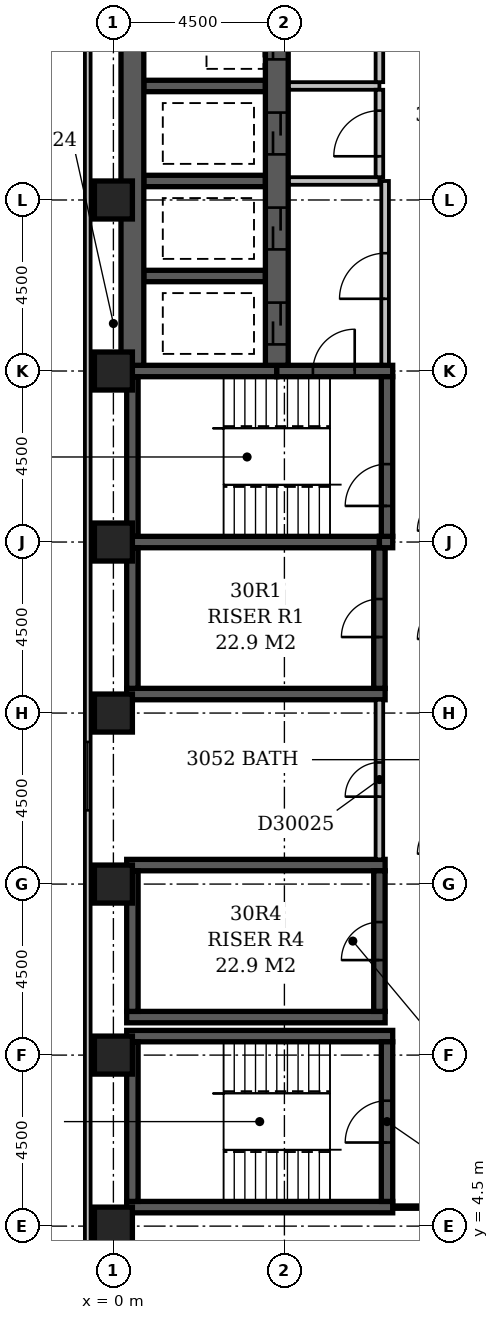
"""IFC4 building model, lengths in metres.
Left out: names, types, materials, properties, quantities, classifications, styles, units other than length and angle.
Written with IfcOpenShell. Run it as: python <this file> out.ifc"""

import sys

from ifc_helpers import new_model, si_unit, direction, frame, frame_2d, origin, origin_2d, place, context, subcontext, project, spatial, rectangle, extrude, element, fill, save


model = new_model("IFC4")
c1 = context("Model", 3, precision=1e-05, world=origin(), true_north=direction((0.0, 1.0)))
c2 = subcontext(c1, "Body", "Model", "MODEL_VIEW")
j1 = project(units=[si_unit("LENGTHUNIT", "METRE"), si_unit("PLANEANGLEUNIT", "RADIAN")], contexts=[c1])
p1 = place(None, origin())
s1 = spatial("IfcSite", under=j1, at=p1, CompositionType="ELEMENT")
p2 = place(p1, origin())
s2 = spatial("IfcBuilding", under=s1, at=p2, CompositionType="ELEMENT")
p3 = place(p2, frame((0.0, 0.0, 123.2)))
s3 = spatial("IfcBuildingStorey", under=s2, at=p3, CompositionType="ELEMENT", Elevation=123.2)
for number, where, z_axis, x_axis in (
    (1, (0.35, 5.0, -0.3), (0.0, 0.0, 1.0), (1.0, 0.0, 0.0)),
    (2, (0.35, 9.5, -0.3), (0.0, 0.0, 1.0), (1.0, 0.0, 0.0)),
):
    element("IfcWall", number, at=place(p3, frame(where, z_axis=z_axis, x_axis=x_axis)), inside=s3, PredefinedType="SHEAR", context=c2, shape_type="SweptSolid", body=[
        extrude(rectangle(XDim=7.0, YDim=0.3, at=frame_2d((3.5, 0.0))), origin(), (0.0, 0.0, 1.0), 3.6),
    ])
for number, where, z_axis, x_axis in (
    (3, (0.35, 10.0, -0.3), (0.0, 0.0, 1.0), (1.0, 0.0, 0.0)),
    (4, (0.35, 14.0, -0.3), (0.0, 0.0, 1.0), (1.0, 0.0, 0.0)),
    (5, (0.35, 18.5, -0.3), (0.0, 0.0, 1.0), (1.0, 0.0, 0.0)),
):
    element("IfcWall", number, at=place(p3, frame(where, z_axis=z_axis, x_axis=x_axis)), inside=s3, PredefinedType="SHEAR", context=c2, shape_type="SweptSolid", body=[
        extrude(rectangle(XDim=6.8, YDim=0.3, at=frame_2d((3.4, 0.0))), origin(), (0.0, 0.0, 1.0), 3.6),
    ])
p4 = place(p3, frame((0.35, 22.5, -0.3), z_axis=(0.0, 0.0, 1.0), x_axis=(1.0, 0.0, 0.0)))
e6 = element("IfcWall", 6, at=p4, inside=s3, PredefinedType="SHEAR", context=c2, shape_type="SweptSolid", body=[
    extrude(rectangle(XDim=6.65, YDim=0.3, at=frame_2d((3.325, 0.0))), origin(), (0.0, 0.0, 1.0), 3.6),
])
p5 = place(p3, frame((0.35, 27.0, -0.3), z_axis=(0.0, 0.0, 1.0), x_axis=(1.0, 0.0, 0.0)))
e7 = element("IfcWall", 7, at=p5, inside=s3, PredefinedType="SHEAR", context=c2, shape_type="SweptSolid", body=[
    extrude(rectangle(XDim=3.95, YDim=0.3, at=frame_2d((1.975, 0.0))), origin(), (0.0, 0.0, 1.0), 3.6),
])
p6 = place(p3, frame((0.5, 5.15, -0.3), z_axis=(0.0, 0.0, 1.0), x_axis=(0.0, 1.0, 0.0)))
e8 = element("IfcWall", 8, at=p6, inside=s3, PredefinedType="SHEAR", context=c2, shape_type="SweptSolid", body=[
    extrude(rectangle(XDim=4.2, YDim=0.3, at=frame_2d((2.1, 0.0))), origin(), (0.0, 0.0, 1.0), 3.6),
])
for number, where, z_axis, x_axis in (
    (9, (0.5, 10.15, -0.3), (0.0, 0.0, 1.0), (0.0, 1.0, 0.0)),
    (10, (0.5, 18.65, -0.3), (0.0, 0.0, 1.0), (0.0, 1.0, 0.0)),
):
    element("IfcWall", number, at=place(p3, frame(where, z_axis=z_axis, x_axis=x_axis)), inside=s3, PredefinedType="SHEAR", context=c2, shape_type="SweptSolid", body=[
        extrude(rectangle(XDim=3.7, YDim=0.3, at=frame_2d((1.85, 0.0))), origin(), (0.0, 0.0, 1.0), 3.6),
    ])
p7 = place(p3, frame((0.5, 22.65, -0.3), z_axis=(0.0, 0.0, 1.0), x_axis=(0.0, 1.0, 0.0)))
e11 = element("IfcWall", 11, at=p7, inside=s3, PredefinedType="SHEAR", context=c2, shape_type="SweptSolid", body=[
    extrude(rectangle(XDim=4.2, YDim=0.3, at=frame_2d((2.1, 0.0))), origin(), (0.0, 0.0, 1.0), 3.6),
])
p8 = place(p3, frame((0.5, 27.15, -0.3), z_axis=(0.0, 0.0, 1.0), x_axis=(0.0, 1.0, 0.0)))
e12 = element("IfcWall", 12, at=p8, inside=s3, PredefinedType="SHEAR", context=c2, shape_type="SweptSolid", body=[
    extrude(rectangle(XDim=22.05, YDim=0.6, at=frame_2d((11.025, 0.0))), origin(), (0.0, 0.0, 1.0), 3.6),
])
for number, where, z_axis, x_axis in (
    (13, (0.8, 29.5, -0.3), (0.0, 0.0, 1.0), (1.0, 0.0, 0.0)),
    (14, (0.8, 32.0, -0.3), (0.0, 0.0, 1.0), (1.0, 0.0, 0.0)),
    (15, (0.8, 34.5, -0.3), (0.0, 0.0, 1.0), (1.0, 0.0, 0.0)),
):
    element("IfcWall", number, at=place(p3, frame(where, z_axis=z_axis, x_axis=x_axis)), inside=s3, PredefinedType="SHEAR", context=c2, shape_type="SweptSolid", body=[
        extrude(rectangle(XDim=3.2, YDim=0.3, at=frame_2d((1.6, 0.0))), origin(), (0.0, 0.0, 1.0), 3.6),
    ])
p9 = place(p3, frame((4.3, 27.0, -0.3), z_axis=(0.0, 0.0, 1.0), x_axis=(1.0, 0.0, 0.0)))
e16 = element("IfcWall", 16, at=p9, inside=s3, PredefinedType="SHEAR", context=c2, shape_type="SweptSolid", body=[
    extrude(rectangle(XDim=3.05, YDim=0.3, at=frame_2d((1.525, 0.0))), origin(), (0.0, 0.0, 1.0), 3.6),
])
p10 = place(p9, frame((0.95, 0.0, 0.3)))
e17 = element("IfcOpeningElement", 17, at=p10, cuts=e16, PredefinedType="OPENING", context=c2, shape_type="SweptSolid", body=[
    extrude(rectangle(XDim=1.1, YDim=2.1, at=frame_2d((0.55, 1.05))), frame((0.0, 0.162, 0.0), z_axis=(0.0, -1.0, 0.0), x_axis=(1.0, 0.0, 0.0)), (0.0, 0.0, 1.0), 0.324),
])
p11 = place(p3, frame((4.3, 27.15, -0.3), z_axis=(0.0, 0.0, 1.0), x_axis=(0.0, 1.0, 0.0)))
e18 = element("IfcWall", 18, at=p11, inside=s3, PredefinedType="SHEAR", context=c2, shape_type="SweptSolid", body=[
    extrude(rectangle(XDim=22.05, YDim=0.6, at=frame_2d((11.025, 0.0))), origin(), (0.0, 0.0, 1.0), 3.6),
])
p12 = place(p11, frame((3.05, 0.0, 0.3)))
e19 = element("IfcOpeningElement", 19, at=p12, cuts=e18, PredefinedType="OPENING", context=c2, shape_type="SweptSolid", body=[
    extrude(rectangle(XDim=1.1, YDim=2.1, at=frame_2d((0.55, 1.05))), frame((0.0, 0.312, 0.0), z_axis=(0.0, -1.0, 0.0), x_axis=(1.0, 0.0, 0.0)), (0.0, 0.0, 1.0), 0.624),
])
p13 = place(p11, frame((0.55, 0.0, 0.3)))
e20 = element("IfcOpeningElement", 20, at=p13, cuts=e18, PredefinedType="OPENING", context=c2, shape_type="SweptSolid", body=[
    extrude(rectangle(XDim=1.1, YDim=2.1, at=frame_2d((0.55, 1.05))), frame((0.0, 0.312, 0.0), z_axis=(0.0, -1.0, 0.0), x_axis=(1.0, 0.0, 0.0)), (0.0, 0.0, 1.0), 0.624),
])
p14 = place(p11, frame((20.55, 0.0, 0.3)))
e21 = element("IfcOpeningElement", 21, at=p14, cuts=e18, PredefinedType="OPENING", context=c2, shape_type="SweptSolid", body=[
    extrude(rectangle(XDim=1.1, YDim=2.1, at=frame_2d((0.55, 1.05))), frame((0.0, 0.312, 0.0), z_axis=(0.0, -1.0, 0.0), x_axis=(1.0, 0.0, 0.0)), (0.0, 0.0, 1.0), 0.624),
])
p15 = place(p11, frame((18.05, 0.0, 0.3)))
e22 = element("IfcOpeningElement", 22, at=p15, cuts=e18, PredefinedType="OPENING", context=c2, shape_type="SweptSolid", body=[
    extrude(rectangle(XDim=1.1, YDim=2.1, at=frame_2d((0.55, 1.05))), frame((0.0, 0.312, 0.0), z_axis=(0.0, -1.0, 0.0), x_axis=(1.0, 0.0, 0.0)), (0.0, 0.0, 1.0), 0.624),
])
p16 = place(p11, frame((15.55, 0.0, 0.3)))
e23 = element("IfcOpeningElement", 23, at=p16, cuts=e18, PredefinedType="OPENING", context=c2, shape_type="SweptSolid", body=[
    extrude(rectangle(XDim=1.1, YDim=2.1, at=frame_2d((0.55, 1.05))), frame((0.0, 0.312, 0.0), z_axis=(0.0, -1.0, 0.0), x_axis=(1.0, 0.0, 0.0)), (0.0, 0.0, 1.0), 0.624),
])
p17 = place(p11, frame((13.05, 0.0, 0.3)))
e24 = element("IfcOpeningElement", 24, at=p17, cuts=e18, PredefinedType="OPENING", context=c2, shape_type="SweptSolid", body=[
    extrude(rectangle(XDim=1.1, YDim=2.1, at=frame_2d((0.55, 1.05))), frame((0.0, 0.312, 0.0), z_axis=(0.0, -1.0, 0.0), x_axis=(1.0, 0.0, 0.0)), (0.0, 0.0, 1.0), 0.624),
])
p18 = place(p11, frame((10.55, 0.0, 0.3)))
e25 = element("IfcOpeningElement", 25, at=p18, cuts=e18, PredefinedType="OPENING", context=c2, shape_type="SweptSolid", body=[
    extrude(rectangle(XDim=1.1, YDim=2.1, at=frame_2d((0.55, 1.05))), frame((0.0, 0.312, 0.0), z_axis=(0.0, -1.0, 0.0), x_axis=(1.0, 0.0, 0.0)), (0.0, 0.0, 1.0), 0.624),
])
p19 = place(p11, frame((8.05, 0.0, 0.3)))
e26 = element("IfcOpeningElement", 26, at=p19, cuts=e18, PredefinedType="OPENING", context=c2, shape_type="SweptSolid", body=[
    extrude(rectangle(XDim=1.1, YDim=2.1, at=frame_2d((0.55, 1.05))), frame((0.0, 0.312, 0.0), z_axis=(0.0, -1.0, 0.0), x_axis=(1.0, 0.0, 0.0)), (0.0, 0.0, 1.0), 0.624),
])
p20 = place(p11, frame((5.55, 0.0, 0.3)))
e27 = element("IfcOpeningElement", 27, at=p20, cuts=e18, PredefinedType="OPENING", context=c2, shape_type="SweptSolid", body=[
    extrude(rectangle(XDim=1.1, YDim=2.1, at=frame_2d((0.55, 1.05))), frame((0.0, 0.312, 0.0), z_axis=(0.0, -1.0, 0.0), x_axis=(1.0, 0.0, 0.0)), (0.0, 0.0, 1.0), 0.624),
])
p21 = place(p3, frame((7.0, 10.15, -0.3), z_axis=(0.0, 0.0, 1.0), x_axis=(0.0, 1.0, 0.0)))
e28 = element("IfcWall", 28, at=p21, inside=s3, PredefinedType="SHEAR", context=c2, shape_type="SweptSolid", body=[
    extrude(rectangle(XDim=3.7, YDim=0.3, at=frame_2d((1.85, 0.0))), origin(), (0.0, 0.0, 1.0), 3.6),
])
p22 = place(p21, frame((1.35, 0.0, 0.3)))
e29 = element("IfcOpeningElement", 29, at=p22, cuts=e28, PredefinedType="OPENING", context=c2, shape_type="SweptSolid", body=[
    extrude(rectangle(XDim=1.0, YDim=2.1, at=frame_2d((0.5, 1.05))), frame((0.0, 0.162, 0.0), z_axis=(0.0, -1.0, 0.0), x_axis=(1.0, 0.0, 0.0)), (0.0, 0.0, 1.0), 0.324),
])
p23 = place(p3, frame((7.0, 18.65, -0.3), z_axis=(0.0, 0.0, 1.0), x_axis=(0.0, 1.0, 0.0)))
e30 = element("IfcWall", 30, at=p23, inside=s3, PredefinedType="SHEAR", context=c2, shape_type="SweptSolid", body=[
    extrude(rectangle(XDim=3.7, YDim=0.3, at=frame_2d((1.85, 0.0))), origin(), (0.0, 0.0, 1.0), 3.6),
])
p24 = place(p23, frame((1.35, 0.0, 0.3)))
e31 = element("IfcOpeningElement", 31, at=p24, cuts=e30, PredefinedType="OPENING", context=c2, shape_type="SweptSolid", body=[
    extrude(rectangle(XDim=1.0, YDim=2.1, at=frame_2d((0.5, 1.05))), frame((0.0, 0.162, 0.0), z_axis=(0.0, -1.0, 0.0), x_axis=(1.0, 0.0, 0.0)), (0.0, 0.0, 1.0), 0.324),
])
p25 = place(p3, frame((7.0, 22.5, -0.3), z_axis=(0.0, 0.0, 1.0), x_axis=(1.0, 0.0, 0.0)))
e32 = element("IfcWall", 32, at=p25, inside=s3, PredefinedType="SHEAR", context=c2, shape_type="SweptSolid", body=[
    extrude(rectangle(XDim=0.35, YDim=0.3, at=frame_2d((0.175, 0.0))), origin(), (0.0, 0.0, 1.0), 3.6),
])
p26 = place(p3, frame((7.2, 5.15, -0.3), z_axis=(0.0, 0.0, 1.0), x_axis=(0.0, 1.0, 0.0)))
e33 = element("IfcWall", 33, at=p26, inside=s3, PredefinedType="SHEAR", context=c2, shape_type="SweptSolid", body=[
    extrude(rectangle(XDim=4.2, YDim=0.3, at=frame_2d((2.1, 0.0))), origin(), (0.0, 0.0, 1.0), 3.6),
])
p27 = place(p26, frame((1.55, 0.0, 0.3)))
e34 = element("IfcOpeningElement", 34, at=p27, cuts=e33, PredefinedType="OPENING", context=c2, shape_type="SweptSolid", body=[
    extrude(rectangle(XDim=1.1, YDim=2.1, at=frame_2d((0.55, 1.05))), frame((0.0, 0.162, 0.0), z_axis=(0.0, -1.0, 0.0), x_axis=(1.0, 0.0, 0.0)), (0.0, 0.0, 1.0), 0.324),
])
p28 = place(p3, frame((7.2, 22.65, -0.3), z_axis=(0.0, 0.0, 1.0), x_axis=(0.0, 1.0, 0.0)))
e35 = element("IfcWall", 35, at=p28, inside=s3, PredefinedType="SHEAR", context=c2, shape_type="SweptSolid", body=[
    extrude(rectangle(XDim=4.2, YDim=0.3, at=frame_2d((2.1, 0.0))), origin(), (0.0, 0.0, 1.0), 3.6),
])
p29 = place(p28, frame((0.8, 0.0, 0.3)))
e36 = element("IfcOpeningElement", 36, at=p29, cuts=e35, PredefinedType="OPENING", context=c2, shape_type="SweptSolid", body=[
    extrude(rectangle(XDim=1.1, YDim=2.1, at=frame_2d((0.55, 1.05))), frame((0.0, 0.162, 0.0), z_axis=(0.0, -1.0, 0.0), x_axis=(1.0, 0.0, 0.0)), (0.0, 0.0, 1.0), 0.324),
])
for number, where, z_axis, x_axis in (
    (37, (0.0, 4.5, -0.3), (0.0, 0.0, 1.0), (1.0, 0.0, 0.0)),
    (38, (0.0, 9.0, -0.3), (0.0, 0.0, 1.0), (1.0, 0.0, 0.0)),
    (39, (0.0, 13.5, -0.3), (0.0, 0.0, 1.0), (1.0, 0.0, 0.0)),
    (40, (0.0, 18.0, -0.3), (0.0, 0.0, 1.0), (1.0, 0.0, 0.0)),
    (41, (0.0, 22.5, -0.3), (0.0, 0.0, 1.0), (1.0, 0.0, 0.0)),
    (42, (0.0, 27.0, -0.3), (0.0, 0.0, 1.0), (1.0, 0.0, 0.0)),
    (43, (0.0, 31.5, -0.3), (0.0, 0.0, 1.0), (1.0, 0.0, 0.0)),
):
    element("IfcColumn", number, at=place(p3, frame(where, z_axis=z_axis, x_axis=x_axis)), inside=s3, PredefinedType="COLUMN", context=c2, shape_type="SweptSolid", body=[
        extrude(rectangle(XDim=1.0, YDim=1.0, at=origin_2d()), origin(), (0.0, 0.0, 1.0), 3.6),
    ])
p30 = place(p3, frame((-0.675, 59.1, 0.0), z_axis=(0.0, 0.0, 1.0), x_axis=(0.0, -1.0, 0.0)))
e44 = element("IfcWall", 44, at=p30, inside=s3, PredefinedType="STANDARD", context=c2, shape_type="SweptSolid", body=[
    extrude(rectangle(XDim=55.35, YDim=0.15, at=frame_2d((27.675, 0.0))), origin(), (0.0, 0.0, 1.0), 2.7),
])
p31 = place(p30, frame((41.86, 0.0, 0.6)))
e45 = element("IfcOpeningElement", 45, at=p31, cuts=e44, PredefinedType="OPENING", context=c2, shape_type="SweptSolid", body=[
    extrude(rectangle(XDim=1.8, YDim=1.8, at=frame_2d((0.9, 0.9))), frame((0.0, 0.087, 0.0), z_axis=(0.0, -1.0, 0.0), x_axis=(1.0, 0.0, 0.0)), (0.0, 0.0, 1.0), 0.174),
])
p32 = place(p3, frame((4.62, 34.5, 0.0), z_axis=(0.0, 0.0, 1.0), x_axis=(1.0, 0.0, 0.0)))
e46 = element("IfcWall", 46, at=p32, inside=s3, PredefinedType="PARTITIONING", context=c2, shape_type="SweptSolid", body=[
    extrude(rectangle(XDim=2.38, YDim=0.2, at=frame_2d((1.19, 0.0))), origin(), (0.0, 0.0, 1.0), 3.3),
])
p33 = place(p3, frame((7.0, 34.6, 0.0), z_axis=(0.0, 0.0, 1.0), x_axis=(0.0, 1.0, 0.0)))
e47 = element("IfcWall", 47, at=p33, inside=s3, PredefinedType="PARTITIONING", context=c2, shape_type="SweptSolid", body=[
    extrude(rectangle(XDim=14.9, YDim=0.2, at=frame_2d((7.45, 0.0))), origin(), (0.0, 0.0, 1.0), 3.3),
])
p34 = place(p33, frame((2.8, 0.0, 0.0)))
e48 = element("IfcOpeningElement", 48, at=p34, cuts=e47, PredefinedType="OPENING", context=c2, shape_type="SweptSolid", body=[
    extrude(rectangle(XDim=1.2, YDim=2.1, at=frame_2d((0.6, 1.05))), frame((0.0, 0.112, 0.0), z_axis=(0.0, -1.0, 0.0), x_axis=(1.0, 0.0, 0.0)), (0.0, 0.0, 1.0), 0.224),
])
p35 = place(p33, frame((9.8, 0.0, 0.0)))
e49 = element("IfcOpeningElement", 49, at=p35, cuts=e47, PredefinedType="OPENING", context=c2, shape_type="SweptSolid", body=[
    extrude(rectangle(XDim=1.2, YDim=2.1, at=frame_2d((0.6, 1.05))), frame((0.0, 0.112, 0.0), z_axis=(0.0, -1.0, 0.0), x_axis=(1.0, 0.0, 0.0)), (0.0, 0.0, 1.0), 0.224),
])
p36 = place(p3, frame((4.62, 32.0, 0.0), z_axis=(0.0, 0.0, 1.0), x_axis=(1.0, 0.0, 0.0)))
e50 = element("IfcWall", 50, at=p36, inside=s3, PredefinedType="PARTITIONING", context=c2, shape_type="SweptSolid", body=[
    extrude(rectangle(XDim=2.38, YDim=0.2, at=frame_2d((1.19, 0.0))), origin(), (0.0, 0.0, 1.0), 3.3),
])
p37 = place(p3, frame((7.0, 32.1, 0.0), z_axis=(0.0, 0.0, 1.0), x_axis=(0.0, 1.0, 0.0)))
e51 = element("IfcWall", 51, at=p37, inside=s3, PredefinedType="PARTITIONING", context=c2, shape_type="SweptSolid", body=[
    extrude(rectangle(XDim=2.3, YDim=0.2, at=frame_2d((1.15, 0.0))), origin(), (0.0, 0.0, 1.0), 3.3),
])
p38 = place(p37, frame((0.55, 0.0, 0.0)))
e52 = element("IfcOpeningElement", 52, at=p38, cuts=e51, PredefinedType="OPENING", context=c2, shape_type="SweptSolid", body=[
    extrude(rectangle(XDim=1.2, YDim=2.1, at=frame_2d((0.6, 1.05))), frame((0.0, 0.112, 0.0), z_axis=(0.0, -1.0, 0.0), x_axis=(1.0, 0.0, 0.0)), (0.0, 0.0, 1.0), 0.224),
])
p39 = place(p3, frame((7.15, 27.17, 0.0), z_axis=(0.0, 0.0, 1.0), x_axis=(0.0, 1.0, 0.0)))
e53 = element("IfcWall", 53, at=p39, inside=s3, PredefinedType="PARTITIONING", context=c2, shape_type="SweptSolid", body=[
    extrude(rectangle(XDim=4.83, YDim=0.2, at=frame_2d((2.415, 0.0))), origin(), (0.0, 0.0, 1.0), 3.3),
])
p40 = place(p39, frame((1.73, 0.0, 0.0)))
e54 = element("IfcOpeningElement", 54, at=p40, cuts=e53, PredefinedType="OPENING", context=c2, shape_type="SweptSolid", body=[
    extrude(rectangle(XDim=1.2, YDim=2.1, at=frame_2d((0.6, 1.05))), frame((0.0, 0.112, 0.0), z_axis=(0.0, -1.0, 0.0), x_axis=(1.0, 0.0, 0.0)), (0.0, 0.0, 1.0), 0.224),
])
p41 = place(p3, frame((0.0, 4.5, 0.0), z_axis=(0.0, 0.0, 1.0), x_axis=(0.0, 1.0, 0.0)))
e55 = element("IfcWall", 55, at=p41, inside=s3, PredefinedType="PARTITIONING", context=c2, shape_type="SweptSolid", body=[
    extrude(rectangle(XDim=0.5, YDim=0.1, at=frame_2d((0.25, 0.0))), origin(), (0.0, 0.0, 1.0), 2.7),
])
p42 = place(p3, frame((7.349, 5.0, 0.0), z_axis=(0.0, 0.0, 1.0), x_axis=(1.0, 0.0, 0.0)))
e56 = element("IfcWall", 56, at=p42, inside=s3, PredefinedType="PARTITIONING", context=c2, shape_type="SweptSolid", body=[
    extrude(rectangle(XDim=1.551, YDim=0.1, at=frame_2d((0.775, 0.0))), origin(), (0.0, 0.0, 1.0), 3.3),
])
p43 = place(p3, frame((7.0, 14.15, 0.0), z_axis=(0.0, 0.0, 1.0), x_axis=(0.0, 1.0, 0.0)))
e57 = element("IfcWall", 57, at=p43, inside=s3, PredefinedType="PARTITIONING", context=c2, shape_type="SweptSolid", body=[
    extrude(rectangle(XDim=4.2, YDim=0.2, at=frame_2d((2.1, 0.0))), origin(), (0.0, 0.0, 1.0), 3.3),
])
p44 = place(p43, frame((1.65, 0.0, 0.0)))
e58 = element("IfcOpeningElement", 58, at=p44, cuts=e57, PredefinedType="OPENING", context=c2, shape_type="SweptSolid", body=[
    extrude(rectangle(XDim=0.9, YDim=2.1, at=frame_2d((0.45, 1.05))), frame((0.0, 0.112, 0.0), z_axis=(0.0, -1.0, 0.0), x_axis=(1.0, 0.0, 0.0)), (0.0, 0.0, 1.0), 0.224),
])
p45 = place(p31, origin())
e59 = element("IfcWindow", 59, at=p45, inside=s3, PartitioningType="SINGLE_PANEL", PredefinedType="WINDOW", context=c2, shape_type="SweptSolid", body=[
    extrude(rectangle(XDim=1.8, YDim=1.8, at=frame_2d((0.9, 0.9))), frame((0.0, 0.03, 0.0), z_axis=(0.0, -1.0, 0.0), x_axis=(1.0, 0.0, 0.0)), (0.0, 0.0, 1.0), 0.06),
])
fill(e45, e59)
p46 = place(p40, origin())
e60 = element("IfcDoor", 60, at=p46, inside=s3, OperationType="SINGLE_SWING_LEFT", PredefinedType="DOOR", context=c2, shape_type="SweptSolid", body=[
    extrude(rectangle(XDim=1.2, YDim=2.1, at=frame_2d((0.6, 1.05))), frame((0.0, 0.025, 0.0), z_axis=(0.0, -1.0, 0.0), x_axis=(1.0, 0.0, 0.0)), (0.0, 0.0, 1.0), 0.05),
])
fill(e54, e60)
p47 = place(p12, origin())
e61 = element("IfcDoor", 61, at=p47, inside=s3, OperationType="SLIDING_TO_LEFT", PredefinedType="DOOR", context=c2, shape_type="SweptSolid", body=[
    extrude(rectangle(XDim=1.1, YDim=2.1, at=frame_2d((0.55, 1.05))), frame((0.0, 0.025, 0.0), z_axis=(0.0, -1.0, 0.0), x_axis=(1.0, 0.0, 0.0)), (0.0, 0.0, 1.0), 0.05),
])
fill(e19, e61)
p48 = place(p13, origin())
e62 = element("IfcDoor", 62, at=p48, inside=s3, OperationType="SLIDING_TO_LEFT", PredefinedType="DOOR", context=c2, shape_type="SweptSolid", body=[
    extrude(rectangle(XDim=1.1, YDim=2.1, at=frame_2d((0.55, 1.05))), frame((0.0, 0.025, 0.0), z_axis=(0.0, -1.0, 0.0), x_axis=(1.0, 0.0, 0.0)), (0.0, 0.0, 1.0), 0.05),
])
fill(e20, e62)
p49 = place(p19, origin())
e63 = element("IfcDoor", 63, at=p49, inside=s3, OperationType="SLIDING_TO_LEFT", PredefinedType="DOOR", context=c2, shape_type="SweptSolid", body=[
    extrude(rectangle(XDim=1.1, YDim=2.1, at=frame_2d((0.55, 1.05))), frame((0.0, 0.025, 0.0), z_axis=(0.0, -1.0, 0.0), x_axis=(1.0, 0.0, 0.0)), (0.0, 0.0, 1.0), 0.05),
])
fill(e26, e63)
p50 = place(p38, origin())
e64 = element("IfcDoor", 64, at=p50, inside=s3, OperationType="SINGLE_SWING_LEFT", PredefinedType="DOOR", context=c2, shape_type="SweptSolid", body=[
    extrude(rectangle(XDim=1.2, YDim=2.1, at=frame_2d((0.6, 1.05))), frame((0.0, 0.025, 0.0), z_axis=(0.0, -1.0, 0.0), x_axis=(1.0, 0.0, 0.0)), (0.0, 0.0, 1.0), 0.05),
])
fill(e52, e64)
p51 = place(p20, origin())
e65 = element("IfcDoor", 65, at=p51, inside=s3, OperationType="SLIDING_TO_LEFT", PredefinedType="DOOR", context=c2, shape_type="SweptSolid", body=[
    extrude(rectangle(XDim=1.1, YDim=2.1, at=frame_2d((0.55, 1.05))), frame((0.0, 0.025, 0.0), z_axis=(0.0, -1.0, 0.0), x_axis=(1.0, 0.0, 0.0)), (0.0, 0.0, 1.0), 0.05),
])
fill(e27, e65)
p52 = place(p24, origin())
e66 = element("IfcDoor", 66, at=p52, inside=s3, OperationType="SINGLE_SWING_LEFT", PredefinedType="DOOR", context=c2, shape_type="SweptSolid", body=[
    extrude(rectangle(XDim=1.0, YDim=2.1, at=frame_2d((0.5, 1.05))), frame((0.0, 0.025, 0.0), z_axis=(0.0, -1.0, 0.0), x_axis=(1.0, 0.0, 0.0)), (0.0, 0.0, 1.0), 0.05),
])
fill(e31, e66)
p53 = place(p22, origin())
e67 = element("IfcDoor", 67, at=p53, inside=s3, OperationType="SINGLE_SWING_LEFT", PredefinedType="DOOR", context=c2, shape_type="SweptSolid", body=[
    extrude(rectangle(XDim=1.0, YDim=2.1, at=frame_2d((0.5, 1.05))), frame((0.0, 0.025, 0.0), z_axis=(0.0, -1.0, 0.0), x_axis=(1.0, 0.0, 0.0)), (0.0, 0.0, 1.0), 0.05),
])
fill(e29, e67)
p54 = place(p10, frame((1.1, 0.0, 0.0), z_axis=(0.0, 0.0, 1.0), x_axis=(-1.0, 0.0, 0.0)))
e68 = element("IfcDoor", 68, at=p54, inside=s3, OperationType="SINGLE_SWING_LEFT", PredefinedType="DOOR", context=c2, shape_type="SweptSolid", body=[
    extrude(rectangle(XDim=1.1, YDim=2.1, at=frame_2d((0.55, 1.05))), frame((0.0, 0.025, 0.0), z_axis=(0.0, -1.0, 0.0), x_axis=(1.0, 0.0, 0.0)), (0.0, 0.0, 1.0), 0.05),
])
fill(e17, e68)
p55 = place(p29, origin())
e69 = element("IfcDoor", 69, at=p55, inside=s3, OperationType="SINGLE_SWING_LEFT", PredefinedType="DOOR", context=c2, shape_type="SweptSolid", body=[
    extrude(rectangle(XDim=1.1, YDim=2.1, at=frame_2d((0.55, 1.05))), frame((0.0, 0.025, 0.0), z_axis=(0.0, -1.0, 0.0), x_axis=(1.0, 0.0, 0.0)), (0.0, 0.0, 1.0), 0.05),
])
fill(e36, e69)
p56 = place(p27, origin())
e70 = element("IfcDoor", 70, at=p56, inside=s3, OperationType="SINGLE_SWING_LEFT", PredefinedType="DOOR", context=c2, shape_type="SweptSolid", body=[
    extrude(rectangle(XDim=1.1, YDim=2.1, at=frame_2d((0.55, 1.05))), frame((0.0, 0.025, 0.0), z_axis=(0.0, -1.0, 0.0), x_axis=(1.0, 0.0, 0.0)), (0.0, 0.0, 1.0), 0.05),
])
fill(e34, e70)
p57 = place(p44, origin())
e71 = element("IfcDoor", 71, at=p57, inside=s3, OperationType="SINGLE_SWING_LEFT", PredefinedType="DOOR", context=c2, shape_type="SweptSolid", body=[
    extrude(rectangle(XDim=0.9, YDim=2.1, at=frame_2d((0.45, 1.05))), frame((0.0, 0.025, 0.0), z_axis=(0.0, -1.0, 0.0), x_axis=(1.0, 0.0, 0.0)), (0.0, 0.0, 1.0), 0.05),
])
fill(e58, e71)
save(model, sys.argv[1])
